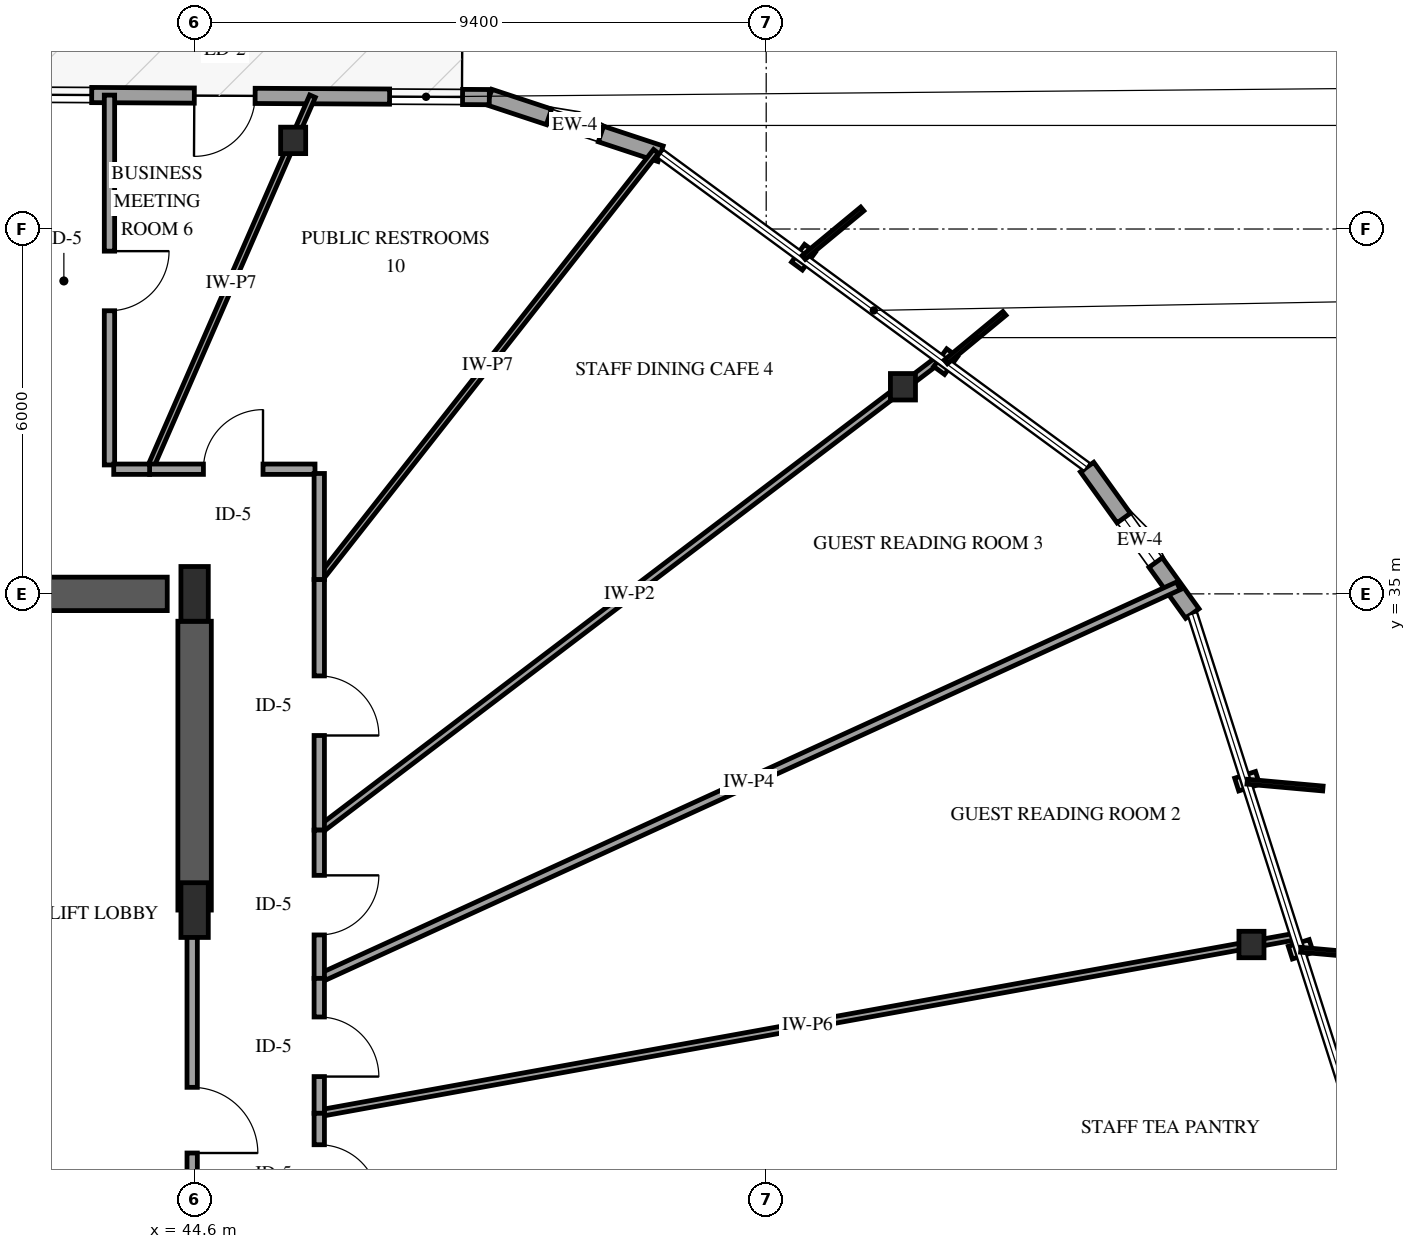
"""IFC4 building model, lengths in metres.
Left out: names, types, materials, properties, quantities, classifications, styles, units other than length and angle.
Written with IfcOpenShell. Run it as: python <this file> out.ifc"""

import sys

from ifc_helpers import new_model, si_unit, direction, frame, frame_2d, origin, origin_2d, place, context, subcontext, project, spatial, rectangle, i_section, extrude, element, fill, save


model = new_model("IFC4")
c1 = context("Model", 3, precision=1e-05, world=origin(), true_north=direction((0.0, 1.0)))
c2 = subcontext(c1, "Body", "Model", "MODEL_VIEW")
j1 = project(units=[si_unit("LENGTHUNIT", "METRE"), si_unit("PLANEANGLEUNIT", "RADIAN")], contexts=[c1])
p1 = place(None, origin())
s1 = spatial("IfcSite", under=j1, at=p1, CompositionType="ELEMENT")
p2 = place(p1, origin())
s2 = spatial("IfcBuilding", under=s1, at=p2, CompositionType="ELEMENT")
p3 = place(p2, frame((0.0, 0.0, 164.2)))
s3 = spatial("IfcBuildingStorey", under=s2, at=p3, CompositionType="ELEMENT", Elevation=164.2)
p4 = place(p3, frame((41.3, 35.0, 0.0), z_axis=(0.0, 0.0, 1.0), x_axis=(1.0, 0.0, 0.0)))
e1 = element("IfcWall", 1, at=p4, inside=s3, PredefinedType="SHEAR", context=c2, shape_type="SweptSolid", body=[
    extrude(rectangle(XDim=2.85, YDim=0.55, at=frame_2d((1.425, 0.0))), origin(), (0.0, 0.0, 1.0), 3.6),
])
p5 = place(p3, frame((44.6, 29.8, 0.0), z_axis=(0.0, 0.0, 1.0), x_axis=(0.0, 1.0, 0.0)))
e2 = element("IfcWall", 2, at=p5, inside=s3, PredefinedType="SHEAR", context=c2, shape_type="SweptSolid", body=[
    extrude(rectangle(XDim=4.75, YDim=0.55, at=frame_2d((2.375, 0.0))), origin(), (0.0, 0.0, 1.0), 3.6),
])
for number, where, z_axis, x_axis in (
    (3, (44.6, 29.8, 0.0), (0.0, 0.0, 1.0), (1.0, 0.0, 0.0)),
    (4, (44.6, 35.0, 0.0), (0.0, 0.0, 1.0), (1.0, 0.0, 0.0)),
):
    element("IfcColumn", number, at=place(p3, frame(where, z_axis=z_axis, x_axis=x_axis)), inside=s3, PredefinedType="PILASTER", context=c2, shape_type="SweptSolid", body=[
        extrude(rectangle(XDim=0.45, YDim=0.9, at=origin_2d()), origin(), (0.0, 0.0, 1.0), 3.6),
    ])
for number, where, z_axis, x_axis in (
    (5, (61.98, 29.234, 0.0), (0.0, 0.0, 1.0), (1.0, 0.0, 0.0)),
    (6, (56.249, 38.406, 0.0), (0.0, 0.0, 1.0), (1.0, 0.0, 0.0)),
    (7, (46.221, 42.458, 0.0), (0.0, 0.0, 1.0), (1.0, 0.0, 0.0)),
):
    element("IfcColumn", number, at=place(p3, frame(where, z_axis=z_axis, x_axis=x_axis)), inside=s3, PredefinedType="COLUMN", context=c2, shape_type="SweptSolid", body=[
        extrude(i_section(OverallWidth=0.412, OverallDepth=0.435, WebThickness=0.036, FlangeThickness=0.057, FilletRadius=0.038, at=origin_2d()), origin(), (0.0, 0.0, 1.0), 3.6),
    ])
p6 = place(p3, frame((52.263, 42.238, 0.0), z_axis=(0.0, 0.0, 1.0), x_axis=(-0.949413160374, 0.314029697494, 0.0)))
e8 = element("IfcWall", 8, at=p6, inside=s3, PredefinedType="SOLIDWALL", context=c2, shape_type="SweptSolid", body=[
    extrude(rectangle(XDim=2.967, YDim=0.27, at=frame_2d((1.483, 0.0))), origin(), (0.0, 0.0, 1.0), 2.679),
])
p7 = place(p6, frame((1.033, 0.0, 0.75)))
e9 = element("IfcOpeningElement", 9, at=p7, cuts=e8, PredefinedType="OPENING", context=c2, shape_type="SweptSolid", body=[
    extrude(rectangle(XDim=0.9, YDim=1.5, at=frame_2d((0.45, 0.75))), frame((0.0, 0.145, 0.0), z_axis=(0.0, -1.0, 0.0), x_axis=(1.0, 0.0, 0.0)), (0.0, 0.0, 1.0), 0.29),
])
p8 = place(p3, frame((49.447, 43.169, 0.0), z_axis=(0.0, 0.0, 1.0), x_axis=(-0.999986386637, 0.005217905737, 0.0)))
e10 = element("IfcWall", 10, at=p8, inside=s3, PredefinedType="SOLIDWALL", context=c2, shape_type="SweptSolid", body=[
    extrude(rectangle(XDim=8.703, YDim=0.25, at=frame_2d((4.351, 0.0))), origin(), (0.0, 0.0, 1.0), 2.679),
])
p9 = place(p8, frame((3.851, 0.0, 0.0)))
e11 = element("IfcOpeningElement", 11, at=p9, cuts=e10, PredefinedType="OPENING", context=c2, shape_type="SweptSolid", body=[
    extrude(rectangle(XDim=1.0, YDim=2.15, at=frame_2d((0.5, 1.075))), frame((0.0, 0.135, 0.0), z_axis=(0.0, -1.0, 0.0), x_axis=(1.0, 0.0, 0.0)), (0.0, 0.0, 1.0), 0.27),
])
p10 = place(p8, frame((0.44, 0.0, 0.72)))
e12 = element("IfcOpeningElement", 12, at=p10, cuts=e10, PredefinedType="OPENING", context=c2, shape_type="SweptSolid", body=[
    extrude(rectangle(XDim=1.2, YDim=1.6, at=frame_2d((0.6, 0.8))), frame((0.0, 0.135, 0.0), z_axis=(0.0, -1.0, 0.0), x_axis=(1.0, 0.0, 0.0)), (0.0, 0.0, 1.0), 0.27),
])
p11 = place(p8, frame((6.539, 0.0, 0.72)))
e13 = element("IfcOpeningElement", 13, at=p11, cuts=e10, PredefinedType="OPENING", context=c2, shape_type="SweptSolid", body=[
    extrude(rectangle(XDim=1.2, YDim=1.6, at=frame_2d((0.6, 0.8))), frame((0.0, 0.135, 0.0), z_axis=(0.0, -1.0, 0.0), x_axis=(1.0, 0.0, 0.0)), (0.0, 0.0, 1.0), 0.27),
])
p12 = place(p3, frame((61.008, 34.677, 0.0), z_axis=(0.0, 0.0, 1.0), x_axis=(-0.583586868665, 0.812050716841, 0.0)))
e14 = element("IfcWall", 14, at=p12, inside=s3, PredefinedType="SOLIDWALL", context=c2, shape_type="SweptSolid", body=[
    extrude(rectangle(XDim=2.967, YDim=0.27, at=frame_2d((1.483, 0.0))), origin(), (0.0, 0.0, 1.0), 2.679),
])
p13 = place(p12, frame((1.033, 0.0, 0.75)))
e15 = element("IfcOpeningElement", 15, at=p13, cuts=e14, PredefinedType="OPENING", context=c2, shape_type="SweptSolid", body=[
    extrude(rectangle(XDim=0.9, YDim=1.5, at=frame_2d((0.45, 0.75))), frame((0.0, 0.145, 0.0), z_axis=(0.0, -1.0, 0.0), x_axis=(1.0, 0.0, 0.0)), (0.0, 0.0, 1.0), 0.29),
])
p14 = place(p3, frame((46.65, 26.458, 0.0), z_axis=(0.0, 0.0, 1.0), x_axis=(0.983996327564, 0.178188740777, 0.0)))
e16 = element("IfcWall", 16, at=p14, inside=s3, PredefinedType="PARTITIONING", context=c2, shape_type="SweptSolid", body=[
    extrude(rectangle(XDim=16.314, YDim=0.11, at=frame_2d((8.157, 0.0))), origin(), (0.0, 0.0, 1.0), 2.595),
])
p15 = place(p3, frame((46.65, 28.677, 0.0), z_axis=(0.0, 0.0, 1.0), x_axis=(0.909570894807, 0.41554877851, 0.0)))
e17 = element("IfcWall", 17, at=p15, inside=s3, PredefinedType="PARTITIONING", context=c2, shape_type="SweptSolid", body=[
    extrude(rectangle(XDim=15.534, YDim=0.14, at=frame_2d((7.767, 0.0))), origin(), (0.0, 0.0, 1.0), 3.3),
])
p16 = place(p3, frame((46.65, 31.115, 0.0), z_axis=(0.0, 0.0, 1.0), x_axis=(0.796354542647, 0.604830093832, 0.0)))
e18 = element("IfcWall", 18, at=p16, inside=s3, PredefinedType="PARTITIONING", context=c2, shape_type="SweptSolid", body=[
    extrude(rectangle(XDim=12.813, YDim=0.12, at=frame_2d((6.407, 0.0))), origin(), (0.0, 0.0, 1.0), 3.3),
])
p17 = place(p3, frame((46.65, 35.237, 0.0), z_axis=(0.0, 0.0, 1.0), x_axis=(0.618211514736, 0.786011783021, 0.0)))
e19 = element("IfcWall", 19, at=p17, inside=s3, PredefinedType="PARTITIONING", context=c2, shape_type="SweptSolid", body=[
    extrude(rectangle(XDim=8.957, YDim=0.1, at=frame_2d((4.478, 0.0))), origin(), (0.0, 0.0, 1.0), 2.678),
])
p18 = place(p3, frame((44.56, 29.8, 0.0), z_axis=(0.0, 0.0, 1.0), x_axis=(0.0, -1.0, 0.0)))
e20 = element("IfcWall", 20, at=p18, inside=s3, PredefinedType="PARTITIONING", context=c2, shape_type="SweptSolid", body=[
    extrude(rectangle(XDim=6.91, YDim=0.17, at=frame_2d((3.455, 0.0))), origin(), (0.0, 0.0, 1.0), 2.34),
])
p19 = place(p18, frame((2.915, 0.0, 0.0)))
e21 = element("IfcOpeningElement", 21, at=p19, cuts=e20, PredefinedType="OPENING", context=c2, shape_type="SweptSolid", body=[
    extrude(rectangle(XDim=1.08, YDim=2.15, at=frame_2d((0.54, 1.075))), frame((0.0, 0.095, 0.0), z_axis=(0.0, -1.0, 0.0), x_axis=(1.0, 0.0, 0.0)), (0.0, 0.0, 1.0), 0.19),
])
p20 = place(p3, frame((43.86, 37.05, 0.0), z_axis=(0.0, 0.0, 1.0), x_axis=(0.400231337716, 0.916414140173, 0.0)))
e22 = element("IfcWall", 22, at=p20, inside=s3, PredefinedType="PARTITIONING", context=c2, shape_type="SweptSolid", body=[
    extrude(rectangle(XDim=6.694, YDim=0.1, at=frame_2d((3.347, 0.0))), origin(), (0.0, 0.0, 1.0), 2.595),
])
p21 = place(p3, frame((43.2, 43.202, 0.0), z_axis=(0.0, 0.0, 1.0), x_axis=(0.0, -1.0, 0.0)))
e23 = element("IfcWall", 23, at=p21, inside=s3, PredefinedType="PARTITIONING", context=c2, shape_type="SweptSolid", body=[
    extrude(rectangle(XDim=6.082, YDim=0.17, at=frame_2d((3.041, 0.0))), origin(), (0.0, 0.0, 1.0), 2.674),
])
p22 = place(p21, frame((2.566, 0.0, 0.0)))
e24 = element("IfcOpeningElement", 24, at=p22, cuts=e23, PredefinedType="OPENING", context=c2, shape_type="SweptSolid", body=[
    extrude(rectangle(XDim=0.98, YDim=2.15, at=frame_2d((0.49, 1.075))), frame((0.0, 0.095, 0.0), z_axis=(0.0, -1.0, 0.0), x_axis=(1.0, 0.0, 0.0)), (0.0, 0.0, 1.0), 0.19),
])
p23 = place(p3, frame((46.65, 35.237, 0.0), z_axis=(0.0, 0.0, 1.0), x_axis=(0.0, -1.0, 0.0)))
e25 = element("IfcWall", 25, at=p23, inside=s3, PredefinedType="PARTITIONING", context=c2, shape_type="SweptSolid", body=[
    extrude(rectangle(XDim=4.122, YDim=0.17, at=frame_2d((2.061, 0.0))), origin(), (0.0, 0.0, 1.0), 3.3),
])
p24 = place(p23, frame((1.586, 0.0, 0.0)))
e26 = element("IfcOpeningElement", 26, at=p24, cuts=e25, PredefinedType="OPENING", context=c2, shape_type="SweptSolid", body=[
    extrude(rectangle(XDim=0.98, YDim=2.15, at=frame_2d((0.49, 1.075))), frame((0.0, 0.095, 0.0), z_axis=(0.0, -1.0, 0.0), x_axis=(1.0, 0.0, 0.0)), (0.0, 0.0, 1.0), 0.19),
])
p25 = place(p3, frame((43.86, 37.05, 0.0), z_axis=(0.0, 0.0, 1.0), x_axis=(1.0, 0.0, 0.0)))
e27 = element("IfcWall", 27, at=p25, inside=s3, PredefinedType="PARTITIONING", context=c2, shape_type="SweptSolid", body=[
    extrude(rectangle(XDim=2.72, YDim=0.17, at=frame_2d((1.36, 0.0))), origin(), (0.0, 0.0, 1.0), 3.3),
])
p26 = place(p25, frame((0.885, 0.0, 0.0)))
e28 = element("IfcOpeningElement", 28, at=p26, cuts=e27, PredefinedType="OPENING", context=c2, shape_type="SweptSolid", body=[
    extrude(rectangle(XDim=0.98, YDim=2.15, at=frame_2d((0.49, 1.075))), frame((0.0, 0.095, 0.0), z_axis=(0.0, -1.0, 0.0), x_axis=(1.0, 0.0, 0.0)), (0.0, 0.0, 1.0), 0.19),
])
p27 = place(p3, frame((46.65, 31.115, 0.0), z_axis=(0.0, 0.0, 1.0), x_axis=(0.0, -1.0, 0.0)))
e29 = element("IfcWall", 29, at=p27, inside=s3, PredefinedType="PARTITIONING", context=c2, shape_type="SweptSolid", body=[
    extrude(rectangle(XDim=2.438, YDim=0.17, at=frame_2d((1.219, 0.0))), origin(), (0.0, 0.0, 1.0), 3.3),
])
p28 = place(p27, frame((0.744, 0.0, 0.0)))
e30 = element("IfcOpeningElement", 30, at=p28, cuts=e29, PredefinedType="OPENING", context=c2, shape_type="SweptSolid", body=[
    extrude(rectangle(XDim=0.98, YDim=2.15, at=frame_2d((0.49, 1.075))), frame((0.0, 0.095, 0.0), z_axis=(0.0, -1.0, 0.0), x_axis=(1.0, 0.0, 0.0)), (0.0, 0.0, 1.0), 0.19),
])
p29 = place(p3, frame((46.65, 28.677, 0.0), z_axis=(0.0, 0.0, 1.0), x_axis=(0.0, -1.0, 0.0)))
e31 = element("IfcWall", 31, at=p29, inside=s3, PredefinedType="PARTITIONING", context=c2, shape_type="SweptSolid", body=[
    extrude(rectangle(XDim=2.219, YDim=0.17, at=frame_2d((1.109, 0.0))), origin(), (0.0, 0.0, 1.0), 3.3),
])
p30 = place(p29, frame((0.635, 0.0, 0.0)))
e32 = element("IfcOpeningElement", 32, at=p30, cuts=e31, PredefinedType="OPENING", context=c2, shape_type="SweptSolid", body=[
    extrude(rectangle(XDim=0.98, YDim=2.15, at=frame_2d((0.49, 1.075))), frame((0.0, 0.095, 0.0), z_axis=(0.0, -1.0, 0.0), x_axis=(1.0, 0.0, 0.0)), (0.0, 0.0, 1.0), 0.19),
])
p31 = place(p3, frame((46.65, 26.458, 0.0), z_axis=(0.0, 0.0, 1.0), x_axis=(0.0, -1.0, 0.0)))
e33 = element("IfcWall", 33, at=p31, inside=s3, PredefinedType="PARTITIONING", context=c2, shape_type="SweptSolid", body=[
    extrude(rectangle(XDim=1.984, YDim=0.17, at=frame_2d((0.992, 0.0))), origin(), (0.0, 0.0, 1.0), 3.3),
])
p32 = place(p31, frame((0.517, 0.0, 0.0)))
e34 = element("IfcOpeningElement", 34, at=p32, cuts=e33, PredefinedType="OPENING", context=c2, shape_type="SweptSolid", body=[
    extrude(rectangle(XDim=0.98, YDim=2.15, at=frame_2d((0.49, 1.075))), frame((0.0, 0.095, 0.0), z_axis=(0.0, -1.0, 0.0), x_axis=(1.0, 0.0, 0.0)), (0.0, 0.0, 1.0), 0.19),
])
p33 = place(p3, frame((46.65, 36.98, 0.0), z_axis=(0.0, 0.0, 1.0), x_axis=(0.0, -1.0, 0.0)))
e35 = element("IfcWall", 35, at=p33, inside=s3, PredefinedType="PARTITIONING", context=c2, shape_type="SweptSolid", body=[
    extrude(rectangle(XDim=1.743, YDim=0.17, at=frame_2d((0.872, 0.0))), origin(), (0.0, 0.0, 1.0), 3.3),
])
p34 = place(p3, frame((43.27, 37.05, 0.0), z_axis=(0.0, 0.0, 1.0), x_axis=(1.0, 0.0, 0.0)))
e36 = element("IfcWall", 36, at=p34, inside=s3, PredefinedType="PARTITIONING", context=c2, shape_type="SweptSolid", body=[
    extrude(rectangle(XDim=0.59, YDim=0.17, at=frame_2d((0.295, 0.0))), origin(), (0.0, 0.0, 1.0), 3.3),
])
p35 = place(p7, origin())
e37 = element("IfcWindow", 37, at=p35, inside=s3, PartitioningType="SINGLE_PANEL", PredefinedType="WINDOW", context=c2, shape_type="SweptSolid", body=[
    extrude(rectangle(XDim=0.9, YDim=1.5, at=frame_2d((0.45, 0.75))), frame((0.0, 0.03, 0.0), z_axis=(0.0, -1.0, 0.0), x_axis=(1.0, 0.0, 0.0)), (0.0, 0.0, 1.0), 0.06),
])
fill(e9, e37)
p36 = place(p9, origin())
e38 = element("IfcDoor", 38, at=p36, inside=s3, OperationType="SINGLE_SWING_RIGHT", PredefinedType="DOOR", context=c2, shape_type="SweptSolid", body=[
    extrude(rectangle(XDim=1.0, YDim=2.15, at=frame_2d((0.5, 1.075))), frame((0.0, 0.025, 0.0), z_axis=(0.0, -1.0, 0.0), x_axis=(1.0, 0.0, 0.0)), (0.0, 0.0, 1.0), 0.05),
])
fill(e11, e38)
p37 = place(p10, origin())
e39 = element("IfcWindow", 39, at=p37, inside=s3, PartitioningType="SINGLE_PANEL", PredefinedType="WINDOW", context=c2, shape_type="SweptSolid", body=[
    extrude(rectangle(XDim=1.2, YDim=1.6, at=frame_2d((0.6, 0.8))), frame((0.0, 0.03, 0.0), z_axis=(0.0, -1.0, 0.0), x_axis=(1.0, 0.0, 0.0)), (0.0, 0.0, 1.0), 0.06),
])
fill(e12, e39)
p38 = place(p11, origin())
e40 = element("IfcWindow", 40, at=p38, inside=s3, PartitioningType="SINGLE_PANEL", PredefinedType="WINDOW", context=c2, shape_type="SweptSolid", body=[
    extrude(rectangle(XDim=1.2, YDim=1.6, at=frame_2d((0.6, 0.8))), frame((0.0, 0.03, 0.0), z_axis=(0.0, -1.0, 0.0), x_axis=(1.0, 0.0, 0.0)), (0.0, 0.0, 1.0), 0.06),
])
fill(e13, e40)
p39 = place(p13, origin())
e41 = element("IfcWindow", 41, at=p39, inside=s3, PartitioningType="SINGLE_PANEL", PredefinedType="WINDOW", context=c2, shape_type="SweptSolid", body=[
    extrude(rectangle(XDim=0.9, YDim=1.5, at=frame_2d((0.45, 0.75))), frame((0.0, 0.03, 0.0), z_axis=(0.0, -1.0, 0.0), x_axis=(1.0, 0.0, 0.0)), (0.0, 0.0, 1.0), 0.06),
])
fill(e15, e41)
p40 = place(p19, origin())
e42 = element("IfcDoor", 42, at=p40, inside=s3, OperationType="SINGLE_SWING_RIGHT", PredefinedType="DOOR", context=c2, shape_type="SweptSolid", body=[
    extrude(rectangle(XDim=1.08, YDim=2.15, at=frame_2d((0.54, 1.075))), frame((0.0, 0.025, 0.0), z_axis=(0.0, -1.0, 0.0), x_axis=(1.0, 0.0, 0.0)), (0.0, 0.0, 1.0), 0.05),
])
fill(e21, e42)
p41 = place(p22, origin())
e43 = element("IfcDoor", 43, at=p41, inside=s3, OperationType="SINGLE_SWING_LEFT", PredefinedType="DOOR", context=c2, shape_type="SweptSolid", body=[
    extrude(rectangle(XDim=0.98, YDim=2.15, at=frame_2d((0.49, 1.075))), frame((0.0, 0.025, 0.0), z_axis=(0.0, -1.0, 0.0), x_axis=(1.0, 0.0, 0.0)), (0.0, 0.0, 1.0), 0.05),
])
fill(e24, e43)
p42 = place(p24, origin())
e44 = element("IfcDoor", 44, at=p42, inside=s3, OperationType="SINGLE_SWING_RIGHT", PredefinedType="DOOR", context=c2, shape_type="SweptSolid", body=[
    extrude(rectangle(XDim=0.98, YDim=2.15, at=frame_2d((0.49, 1.075))), frame((0.0, 0.025, 0.0), z_axis=(0.0, -1.0, 0.0), x_axis=(1.0, 0.0, 0.0)), (0.0, 0.0, 1.0), 0.05),
])
fill(e26, e44)
p43 = place(p26, origin())
e45 = element("IfcDoor", 45, at=p43, inside=s3, OperationType="SINGLE_SWING_RIGHT", PredefinedType="DOOR", context=c2, shape_type="SweptSolid", body=[
    extrude(rectangle(XDim=0.98, YDim=2.15, at=frame_2d((0.49, 1.075))), frame((0.0, 0.025, 0.0), z_axis=(0.0, -1.0, 0.0), x_axis=(1.0, 0.0, 0.0)), (0.0, 0.0, 1.0), 0.05),
])
fill(e28, e45)
p44 = place(p28, origin())
e46 = element("IfcDoor", 46, at=p44, inside=s3, OperationType="SINGLE_SWING_LEFT", PredefinedType="DOOR", context=c2, shape_type="SweptSolid", body=[
    extrude(rectangle(XDim=0.98, YDim=2.15, at=frame_2d((0.49, 1.075))), frame((0.0, 0.025, 0.0), z_axis=(0.0, -1.0, 0.0), x_axis=(1.0, 0.0, 0.0)), (0.0, 0.0, 1.0), 0.05),
])
fill(e30, e46)
p45 = place(p30, origin())
e47 = element("IfcDoor", 47, at=p45, inside=s3, OperationType="SINGLE_SWING_RIGHT", PredefinedType="DOOR", context=c2, shape_type="SweptSolid", body=[
    extrude(rectangle(XDim=0.98, YDim=2.15, at=frame_2d((0.49, 1.075))), frame((0.0, 0.025, 0.0), z_axis=(0.0, -1.0, 0.0), x_axis=(1.0, 0.0, 0.0)), (0.0, 0.0, 1.0), 0.05),
])
fill(e32, e47)
p46 = place(p32, origin())
e48 = element("IfcDoor", 48, at=p46, inside=s3, OperationType="SINGLE_SWING_RIGHT", PredefinedType="DOOR", context=c2, shape_type="SweptSolid", body=[
    extrude(rectangle(XDim=0.98, YDim=2.15, at=frame_2d((0.49, 1.075))), frame((0.0, 0.025, 0.0), z_axis=(0.0, -1.0, 0.0), x_axis=(1.0, 0.0, 0.0)), (0.0, 0.0, 1.0), 0.05),
])
fill(e34, e48)
save(model, sys.argv[1])
